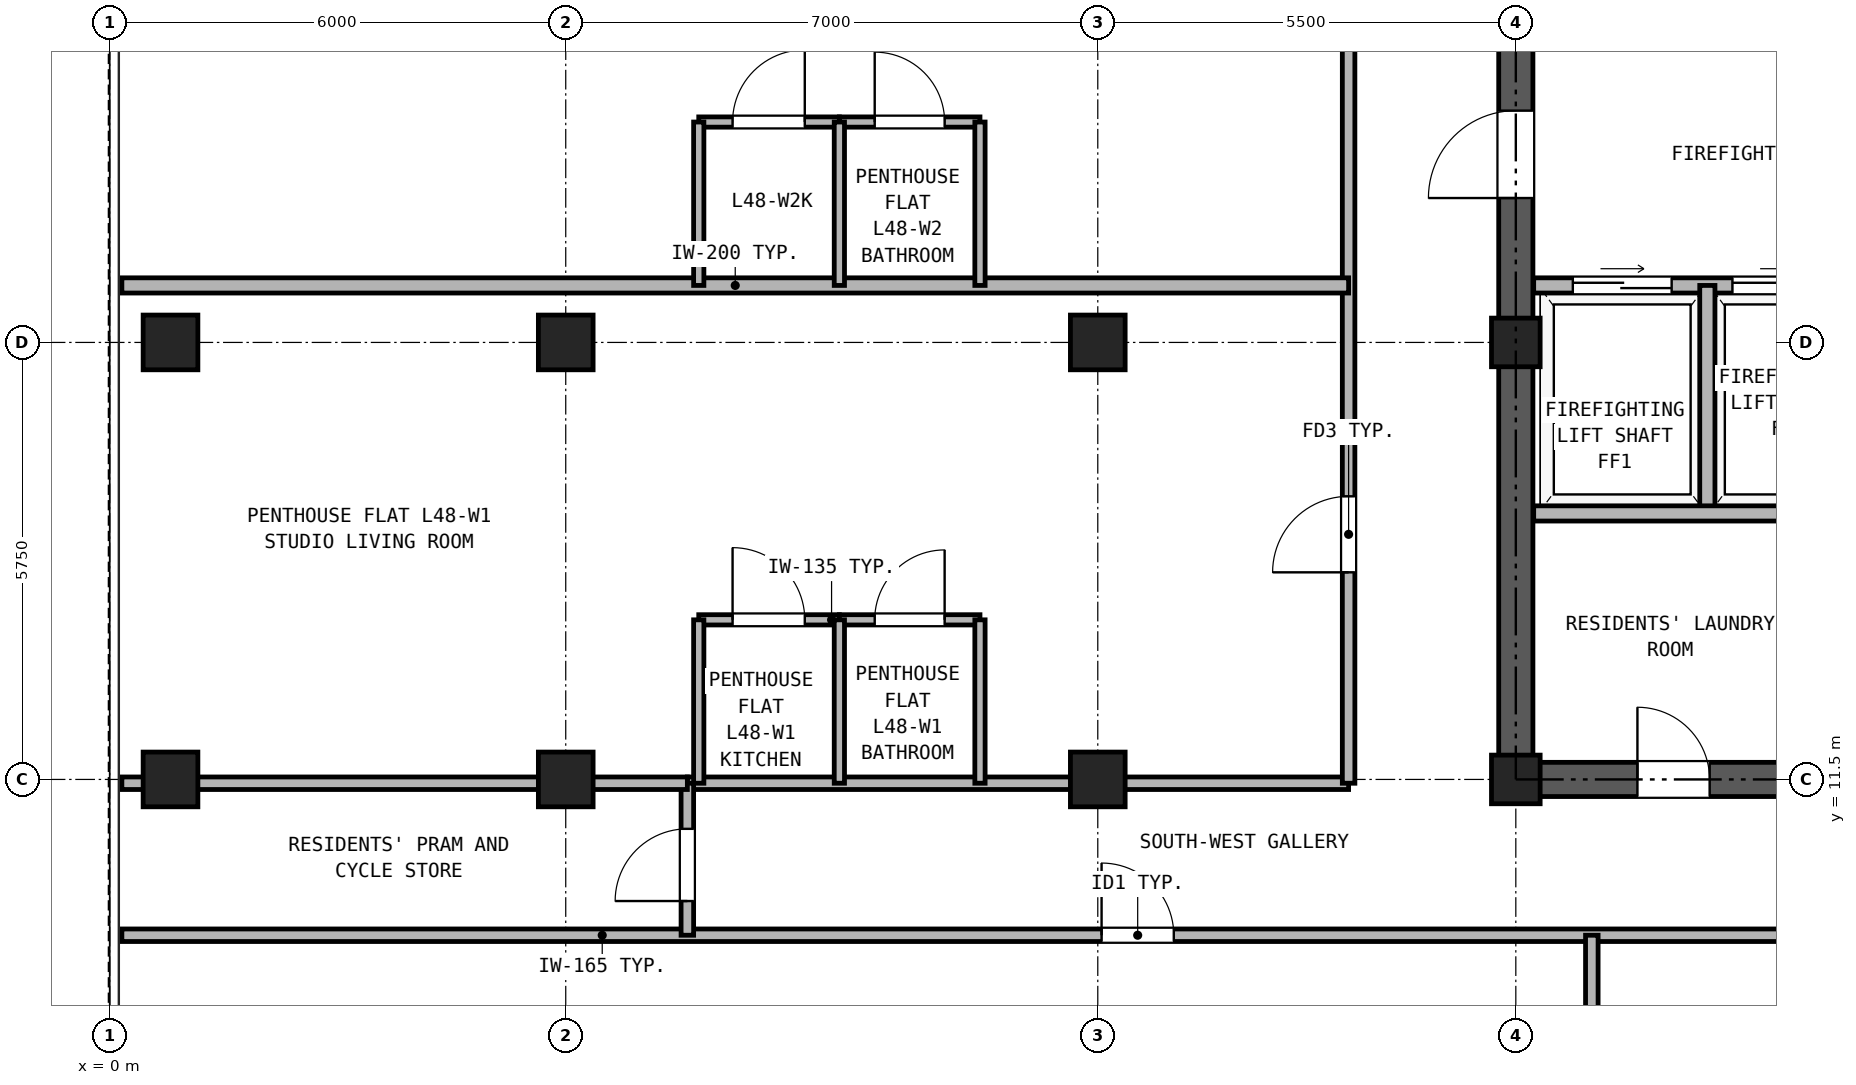
"""IFC4 building model, lengths in metres.
Left out: names, types, materials, properties, quantities, classifications, styles, units other than length and angle.
Written with IfcOpenShell. Run it as: python <this file> out.ifc"""

import sys

from ifc_helpers import new_model, si_unit, direction, frame, frame_2d, origin, origin_2d, place, context, subcontext, project, spatial, rectangle, hollow_rectangle, extrude, source, transform, mapped, element, fill, save


model = new_model("IFC4")
c1 = context("Model", 3, precision=1e-05, world=origin(), true_north=direction((0.0, 1.0)))
c2 = subcontext(c1, "Body", "Model", "MODEL_VIEW")
j1 = project(units=[si_unit("LENGTHUNIT", "METRE"), si_unit("PLANEANGLEUNIT", "RADIAN")], contexts=[c1])
p1 = place(None, origin())
s1 = spatial("IfcSite", under=j1, at=p1, CompositionType="ELEMENT")
p2 = place(p1, origin())
s2 = spatial("IfcBuilding", under=s1, at=p2, CompositionType="ELEMENT")
p3 = place(p2, frame((0.0, 0.0, 172.1)))
s3 = spatial("IfcBuildingStorey", under=s2, at=p3, CompositionType="ELEMENT", Elevation=172.1)
m1 = source(origin(), c2, "Body", "SweptSolid", [
    extrude(hollow_rectangle(XDim=0.72, YDim=0.72, WallThickness=0.04, at=origin_2d()), origin(), (0.0, 0.0, 1.0), 2.95),
])
for number, where, z_axis, x_axis in (
    (1, (0.8, 11.5, 0.0), (0.0, 0.0, 1.0), (1.0, 0.0, 0.0)),
    (2, (0.8, 17.25, 0.0), (0.0, 0.0, 1.0), (1.0, 0.0, 0.0)),
    (3, (6.0, 11.5, 0.0), (0.0, 0.0, 1.0), (1.0, 0.0, 0.0)),
    (4, (6.0, 17.25, 0.0), (0.0, 0.0, 1.0), (1.0, 0.0, 0.0)),
    (5, (13.0, 11.5, 0.0), (0.0, 0.0, 1.0), (1.0, 0.0, 0.0)),
    (6, (13.0, 17.25, 0.0), (0.0, 0.0, 1.0), (1.0, 0.0, 0.0)),
):
    element("IfcColumn", number, at=place(p3, frame(where, z_axis=z_axis, x_axis=x_axis)), inside=s3, PredefinedType="COLUMN", context=c2, shape_type="MappedRepresentation", body=[
        mapped(m1, transform((0.0, 0.0, 0.0), x_axis=(1.0, 0.0, 0.0), y_axis=(0.0, 1.0, 0.0), z_axis=(0.0, 0.0, 1.0), scale=1.0)),
    ])
m2 = source(origin(), c2, "Body", "SweptSolid", [
    extrude(hollow_rectangle(XDim=0.64, YDim=0.64, WallThickness=0.035, at=origin_2d()), origin(), (0.0, 0.0, 1.0), 2.95),
])
for number, where, z_axis, x_axis in (
    (7, (18.5, 11.5, 0.0), (0.0, 0.0, 1.0), (1.0, 0.0, 0.0)),
    (8, (18.5, 17.25, 0.0), (0.0, 0.0, 1.0), (1.0, 0.0, 0.0)),
):
    element("IfcColumn", number, at=place(p3, frame(where, z_axis=z_axis, x_axis=x_axis)), inside=s3, PredefinedType="COLUMN", context=c2, shape_type="MappedRepresentation", body=[
        mapped(m2, transform((0.0, 0.0, 0.0), x_axis=(1.0, 0.0, 0.0), y_axis=(0.0, 1.0, 0.0), z_axis=(0.0, 0.0, 1.0), scale=1.0)),
    ])
p4 = place(p3, frame((18.275, 11.5, 0.0), z_axis=(0.0, 0.0, 1.0), x_axis=(1.0, 0.0, 0.0)))
e9 = element("IfcWall", 9, at=p4, inside=s3, PredefinedType="SHEAR", context=c2, shape_type="SweptSolid", body=[
    extrude(rectangle(XDim=10.45, YDim=0.45, at=frame_2d((5.225, 0.0))), origin(), (0.0, 0.0, 1.0), 2.95),
])
p5 = place(p4, frame((1.825, 0.0, 0.0)))
e10 = element("IfcOpeningElement", 10, at=p5, cuts=e9, PredefinedType="OPENING", context=c2, shape_type="SweptSolid", body=[
    extrude(rectangle(XDim=0.95, YDim=2.15, at=frame_2d((0.475, 1.075))), frame((0.0, 0.235, 0.0), z_axis=(0.0, -1.0, 0.0), x_axis=(1.0, 0.0, 0.0)), (0.0, 0.0, 1.0), 0.47),
])
p6 = place(p4, frame((5.325, 0.0, 0.0)))
e11 = element("IfcOpeningElement", 11, at=p6, cuts=e9, PredefinedType="OPENING", context=c2, shape_type="SweptSolid", body=[
    extrude(rectangle(XDim=0.95, YDim=2.15, at=frame_2d((0.475, 1.075))), frame((0.0, 0.235, 0.0), z_axis=(0.0, -1.0, 0.0), x_axis=(1.0, 0.0, 0.0)), (0.0, 0.0, 1.0), 0.47),
])
p7 = place(p4, frame((8.225, 0.0, 0.0)))
e12 = element("IfcOpeningElement", 12, at=p7, cuts=e9, PredefinedType="OPENING", context=c2, shape_type="SweptSolid", body=[
    extrude(rectangle(XDim=1.1, YDim=2.25, at=frame_2d((0.55, 1.125))), frame((0.0, 0.235, 0.0), z_axis=(0.0, -1.0, 0.0), x_axis=(1.0, 0.0, 0.0)), (0.0, 0.0, 1.0), 0.47),
])
p8 = place(p3, frame((18.5, 11.725, 0.0), z_axis=(0.0, 0.0, 1.0), x_axis=(0.0, 1.0, 0.0)))
e13 = element("IfcWall", 13, at=p8, inside=s3, PredefinedType="SHEAR", context=c2, shape_type="SweptSolid", body=[
    extrude(rectangle(XDim=16.8, YDim=0.45, at=frame_2d((8.4, 0.0))), origin(), (0.0, 0.0, 1.0), 2.95),
])
p9 = place(p8, frame((7.425, 0.0, 0.0)))
e14 = element("IfcOpeningElement", 14, at=p9, cuts=e13, PredefinedType="OPENING", context=c2, shape_type="SweptSolid", body=[
    extrude(rectangle(XDim=1.15, YDim=2.2, at=frame_2d((0.575, 1.1))), frame((0.0, 0.235, 0.0), z_axis=(0.0, -1.0, 0.0), x_axis=(1.0, 0.0, 0.0)), (0.0, 0.0, 1.0), 0.47),
])
p10 = place(p3, frame((18.735, 18.0, 0.0), z_axis=(0.0, 0.0, 1.0), x_axis=(1.0, 0.0, 0.0)))
e15 = element("IfcWall", 15, at=p10, inside=s3, PredefinedType="PARTITIONING", context=c2, shape_type="SweptSolid", body=[
    extrude(rectangle(XDim=9.53, YDim=0.2, at=frame_2d((4.765, 0.0))), origin(), (0.0, 0.0, 1.0), 2.95),
])
p11 = place(p10, frame((0.515, 0.0, 0.0)))
e16 = element("IfcOpeningElement", 16, at=p11, cuts=e15, PredefinedType="OPENING", context=c2, shape_type="SweptSolid", body=[
    extrude(rectangle(XDim=1.3, YDim=2.3, at=frame_2d((0.65, 1.15))), frame((0.0, 0.11, 0.0), z_axis=(0.0, -1.0, 0.0), x_axis=(1.0, 0.0, 0.0)), (0.0, 0.0, 1.0), 0.22),
])
p12 = place(p10, frame((2.615, 0.0, 0.0)))
e17 = element("IfcOpeningElement", 17, at=p12, cuts=e15, PredefinedType="OPENING", context=c2, shape_type="SweptSolid", body=[
    extrude(rectangle(XDim=1.3, YDim=2.3, at=frame_2d((0.65, 1.15))), frame((0.0, 0.11, 0.0), z_axis=(0.0, -1.0, 0.0), x_axis=(1.0, 0.0, 0.0)), (0.0, 0.0, 1.0), 0.22),
])
p13 = place(p10, frame((7.115, 0.0, 0.0)))
e18 = element("IfcOpeningElement", 18, at=p13, cuts=e15, PredefinedType="OPENING", context=c2, shape_type="SweptSolid", body=[
    extrude(rectangle(XDim=1.0, YDim=2.15, at=frame_2d((0.5, 1.075))), frame((0.0, 0.11, 0.0), z_axis=(0.0, -1.0, 0.0), x_axis=(1.0, 0.0, 0.0)), (0.0, 0.0, 1.0), 0.22),
])
p14 = place(p3, frame((21.02, 15.0, 0.0), z_axis=(0.0, 0.0, 1.0), x_axis=(0.0, 1.0, 0.0)))
e19 = element("IfcWall", 19, at=p14, inside=s3, PredefinedType="PARTITIONING", context=c2, shape_type="SweptSolid", body=[
    extrude(rectangle(XDim=3.0, YDim=0.2, at=frame_2d((1.5, 0.0))), origin(), (0.0, 0.0, 1.0), 2.95),
])
p15 = place(p3, frame((18.735, 15.0, 0.0), z_axis=(0.0, 0.0, 1.0), x_axis=(1.0, 0.0, 0.0)))
e20 = element("IfcWall", 20, at=p15, inside=s3, PredefinedType="PARTITIONING", context=c2, shape_type="SweptSolid", body=[
    extrude(rectangle(XDim=9.53, YDim=0.2, at=frame_2d((4.765, 0.0))), origin(), (0.0, 0.0, 1.0), 2.95),
])
p16 = place(p3, frame((0.16, 9.45, 0.0), z_axis=(0.0, 0.0, 1.0), x_axis=(1.0, 0.0, 0.0)))
e21 = element("IfcWall", 21, at=p16, inside=s3, PredefinedType="PARTITIONING", context=c2, shape_type="SweptSolid", body=[
    extrude(rectangle(XDim=41.48, YDim=0.165, at=frame_2d((20.74, 0.0))), origin(), (0.0, 0.0, 1.0), 2.95),
])
p17 = place(p16, frame((12.89, 0.0, 0.0)))
e22 = element("IfcOpeningElement", 22, at=p17, cuts=e21, PredefinedType="OPENING", context=c2, shape_type="SweptSolid", body=[
    extrude(rectangle(XDim=0.95, YDim=2.15, at=frame_2d((0.475, 1.075))), frame((0.0, 0.093, 0.0), z_axis=(0.0, -1.0, 0.0), x_axis=(1.0, 0.0, 0.0)), (0.0, 0.0, 1.0), 0.185),
])
p18 = place(p16, frame((23.34, 0.0, 0.0)))
e23 = element("IfcOpeningElement", 23, at=p18, cuts=e21, PredefinedType="OPENING", context=c2, shape_type="SweptSolid", body=[
    extrude(rectangle(XDim=0.95, YDim=2.15, at=frame_2d((0.475, 1.075))), frame((0.0, 0.093, 0.0), z_axis=(0.0, -1.0, 0.0), x_axis=(1.0, 0.0, 0.0)), (0.0, 0.0, 1.0), 0.185),
])
p19 = place(p16, frame((30.34, 0.0, 0.0)))
e24 = element("IfcOpeningElement", 24, at=p19, cuts=e21, PredefinedType="OPENING", context=c2, shape_type="SweptSolid", body=[
    extrude(rectangle(XDim=0.95, YDim=2.15, at=frame_2d((0.475, 1.075))), frame((0.0, 0.093, 0.0), z_axis=(0.0, -1.0, 0.0), x_axis=(1.0, 0.0, 0.0)), (0.0, 0.0, 1.0), 0.185),
])
p20 = place(p16, frame((35.19, 0.0, 0.0)))
e25 = element("IfcOpeningElement", 25, at=p20, cuts=e21, PredefinedType="OPENING", context=c2, shape_type="SweptSolid", body=[
    extrude(rectangle(XDim=0.95, YDim=2.15, at=frame_2d((0.475, 1.075))), frame((0.0, 0.093, 0.0), z_axis=(0.0, -1.0, 0.0), x_axis=(1.0, 0.0, 0.0)), (0.0, 0.0, 1.0), 0.185),
])
p21 = place(p3, frame((7.6, 11.45, 0.0), z_axis=(0.0, 0.0, 1.0), x_axis=(1.0, 0.0, 0.0)))
e26 = element("IfcWall", 26, at=p21, inside=s3, PredefinedType="PARTITIONING", context=c2, shape_type="SweptSolid", body=[
    extrude(rectangle(XDim=8.7, YDim=0.165, at=frame_2d((4.35, 0.0))), origin(), (0.0, 0.0, 1.0), 2.323),
])
p22 = place(p3, frame((7.6, 9.45, 0.0), z_axis=(0.0, 0.0, 1.0), x_axis=(0.0, 1.0, 0.0)))
e27 = element("IfcWall", 27, at=p22, inside=s3, PredefinedType="PARTITIONING", context=c2, shape_type="SweptSolid", body=[
    extrude(rectangle(XDim=2.0, YDim=0.165, at=frame_2d((1.0, 0.0))), origin(), (0.0, 0.0, 1.0), 2.95),
])
p23 = place(p22, frame((0.45, 0.0, 0.0)))
e28 = element("IfcOpeningElement", 28, at=p23, cuts=e27, PredefinedType="OPENING", context=c2, shape_type="SweptSolid", body=[
    extrude(rectangle(XDim=0.95, YDim=2.15, at=frame_2d((0.475, 1.075))), frame((0.0, 0.093, 0.0), z_axis=(0.0, -1.0, 0.0), x_axis=(1.0, 0.0, 0.0)), (0.0, 0.0, 1.0), 0.185),
])
p24 = place(p3, frame((16.3, 11.45, 0.0), z_axis=(0.0, 0.0, 1.0), x_axis=(0.0, 1.0, 0.0)))
e29 = element("IfcWall", 29, at=p24, inside=s3, PredefinedType="PARTITIONING", context=c2, shape_type="SweptSolid", body=[
    extrude(rectangle(XDim=23.69, YDim=0.165, at=frame_2d((11.845, 0.0))), origin(), (0.0, 0.0, 1.0), 2.95),
])
p25 = place(p24, frame((2.775, 0.0, 0.0)))
e30 = element("IfcOpeningElement", 30, at=p25, cuts=e29, PredefinedType="OPENING", context=c2, shape_type="SweptSolid", body=[
    extrude(rectangle(XDim=1.0, YDim=2.15, at=frame_2d((0.5, 1.075))), frame((0.0, 0.093, 0.0), z_axis=(0.0, -1.0, 0.0), x_axis=(1.0, 0.0, 0.0)), (0.0, 0.0, 1.0), 0.185),
])
p26 = place(p24, frame((10.3, 0.0, 0.0)))
e31 = element("IfcOpeningElement", 31, at=p26, cuts=e29, PredefinedType="OPENING", context=c2, shape_type="SweptSolid", body=[
    extrude(rectangle(XDim=1.0, YDim=2.15, at=frame_2d((0.5, 1.075))), frame((0.0, 0.093, 0.0), z_axis=(0.0, -1.0, 0.0), x_axis=(1.0, 0.0, 0.0)), (0.0, 0.0, 1.0), 0.185),
])
p27 = place(p24, frame((16.575, 0.0, 0.0)))
e32 = element("IfcOpeningElement", 32, at=p27, cuts=e29, PredefinedType="OPENING", context=c2, shape_type="SweptSolid", body=[
    extrude(rectangle(XDim=1.0, YDim=2.15, at=frame_2d((0.5, 1.075))), frame((0.0, 0.093, 0.0), z_axis=(0.0, -1.0, 0.0), x_axis=(1.0, 0.0, 0.0)), (0.0, 0.0, 1.0), 0.185),
])
p28 = place(p3, frame((19.5, 0.16, 0.0), z_axis=(0.0, 0.0, 1.0), x_axis=(0.0, 1.0, 0.0)))
e33 = element("IfcWall", 33, at=p28, inside=s3, PredefinedType="PARTITIONING", context=c2, shape_type="SweptSolid", body=[
    extrude(rectangle(XDim=9.29, YDim=0.165, at=frame_2d((4.645, 0.0))), origin(), (0.0, 0.0, 1.0), 2.95),
])
p29 = place(p3, frame((0.16, 11.45, 0.0), z_axis=(0.0, 0.0, 1.0), x_axis=(1.0, 0.0, 0.0)))
e34 = element("IfcWall", 34, at=p29, inside=s3, PredefinedType="PARTITIONING", context=c2, shape_type="SweptSolid", body=[
    extrude(rectangle(XDim=7.44, YDim=0.165, at=frame_2d((3.72, 0.0))), origin(), (0.0, 0.0, 1.0), 2.323),
])
p30 = place(p3, frame((7.75, 13.6, 0.0), z_axis=(0.0, 0.0, 1.0), x_axis=(1.0, 0.0, 0.0)))
e35 = element("IfcWall", 35, at=p30, inside=s3, PredefinedType="PARTITIONING", context=c2, shape_type="SweptSolid", body=[
    extrude(rectangle(XDim=1.85, YDim=0.135, at=frame_2d((0.925, 0.0))), origin(), (0.0, 0.0, 1.0), 2.95),
])
p31 = place(p30, frame((0.445, 0.0, 0.0)))
e36 = element("IfcOpeningElement", 36, at=p31, cuts=e35, PredefinedType="OPENING", context=c2, shape_type="SweptSolid", body=[
    extrude(rectangle(XDim=0.95, YDim=2.15, at=frame_2d((0.475, 1.075))), frame((0.0, 0.077, 0.0), z_axis=(0.0, -1.0, 0.0), x_axis=(1.0, 0.0, 0.0)), (0.0, 0.0, 1.0), 0.155),
])
p32 = place(p3, frame((9.6, 13.6, 0.0), z_axis=(0.0, 0.0, 1.0), x_axis=(1.0, 0.0, 0.0)))
e37 = element("IfcWall", 37, at=p32, inside=s3, PredefinedType="PARTITIONING", context=c2, shape_type="SweptSolid", body=[
    extrude(rectangle(XDim=1.85, YDim=0.135, at=frame_2d((0.925, 0.0))), origin(), (0.0, 0.0, 1.0), 2.95),
])
p33 = place(p32, frame((0.465, 0.0, 0.0)))
e38 = element("IfcOpeningElement", 38, at=p33, cuts=e37, PredefinedType="OPENING", context=c2, shape_type="SweptSolid", body=[
    extrude(rectangle(XDim=0.92, YDim=2.1, at=frame_2d((0.46, 1.05))), frame((0.0, 0.077, 0.0), z_axis=(0.0, -1.0, 0.0), x_axis=(1.0, 0.0, 0.0)), (0.0, 0.0, 1.0), 0.155),
])
for number, where, z_axis, x_axis in (
    (39, (7.75, 11.45, 0.0), (0.0, 0.0, 1.0), (0.0, 1.0, 0.0)),
    (40, (9.6, 11.45, 0.0), (0.0, 0.0, 1.0), (0.0, 1.0, 0.0)),
    (41, (11.45, 11.45, 0.0), (0.0, 0.0, 1.0), (0.0, 1.0, 0.0)),
):
    element("IfcWall", number, at=place(p3, frame(where, z_axis=z_axis, x_axis=x_axis)), inside=s3, PredefinedType="PARTITIONING", context=c2, shape_type="SweptSolid", body=[
        extrude(rectangle(XDim=2.15, YDim=0.135, at=frame_2d((1.075, 0.0))), origin(), (0.0, 0.0, 1.0), 2.95),
    ])
p34 = place(p3, frame((0.16, 18.0, 0.0), z_axis=(0.0, 0.0, 1.0), x_axis=(1.0, 0.0, 0.0)))
e42 = element("IfcWall", 42, at=p34, inside=s3, PredefinedType="PARTITIONING", context=c2, shape_type="SweptSolid", body=[
    extrude(rectangle(XDim=16.14, YDim=0.2, at=frame_2d((8.07, 0.0))), origin(), (0.0, 0.0, 1.0), 2.95),
])
p35 = place(p3, frame((7.75, 20.15, 0.0), z_axis=(0.0, 0.0, 1.0), x_axis=(1.0, 0.0, 0.0)))
e43 = element("IfcWall", 43, at=p35, inside=s3, PredefinedType="PARTITIONING", context=c2, shape_type="SweptSolid", body=[
    extrude(rectangle(XDim=1.85, YDim=0.135, at=frame_2d((0.925, 0.0))), origin(), (0.0, 0.0, 1.0), 2.583),
])
p36 = place(p35, frame((0.445, 0.0, 0.0)))
e44 = element("IfcOpeningElement", 44, at=p36, cuts=e43, PredefinedType="OPENING", context=c2, shape_type="SweptSolid", body=[
    extrude(rectangle(XDim=0.95, YDim=2.15, at=frame_2d((0.475, 1.075))), frame((0.0, 0.077, 0.0), z_axis=(0.0, -1.0, 0.0), x_axis=(1.0, 0.0, 0.0)), (0.0, 0.0, 1.0), 0.155),
])
p37 = place(p3, frame((9.6, 20.15, 0.0), z_axis=(0.0, 0.0, 1.0), x_axis=(1.0, 0.0, 0.0)))
e45 = element("IfcWall", 45, at=p37, inside=s3, PredefinedType="PARTITIONING", context=c2, shape_type="SweptSolid", body=[
    extrude(rectangle(XDim=1.85, YDim=0.135, at=frame_2d((0.925, 0.0))), origin(), (0.0, 0.0, 1.0), 2.583),
])
p38 = place(p37, frame((0.465, 0.0, 0.0)))
e46 = element("IfcOpeningElement", 46, at=p38, cuts=e45, PredefinedType="OPENING", context=c2, shape_type="SweptSolid", body=[
    extrude(rectangle(XDim=0.92, YDim=2.1, at=frame_2d((0.46, 1.05))), frame((0.0, 0.077, 0.0), z_axis=(0.0, -1.0, 0.0), x_axis=(1.0, 0.0, 0.0)), (0.0, 0.0, 1.0), 0.155),
])
for number, where, z_axis, x_axis in (
    (47, (7.75, 18.0, 0.0), (0.0, 0.0, 1.0), (0.0, 1.0, 0.0)),
    (48, (9.6, 18.0, 0.0), (0.0, 0.0, 1.0), (0.0, 1.0, 0.0)),
    (49, (11.45, 18.0, 0.0), (0.0, 0.0, 1.0), (0.0, 1.0, 0.0)),
):
    element("IfcWall", number, at=place(p3, frame(where, z_axis=z_axis, x_axis=x_axis)), inside=s3, PredefinedType="PARTITIONING", context=c2, shape_type="SweptSolid", body=[
        extrude(rectangle(XDim=2.15, YDim=0.135, at=frame_2d((1.075, 0.0))), origin(), (0.0, 0.0, 1.0), 2.95),
    ])
p39 = place(p11, origin())
e50 = element("IfcDoor", 50, at=p39, inside=s3, OperationType="DOUBLE_DOOR_SLIDING", PredefinedType="DOOR", context=c2, shape_type="SweptSolid", body=[
    extrude(rectangle(XDim=1.3, YDim=2.3, at=frame_2d((0.65, 1.15))), frame((0.0, 0.025, 0.0), z_axis=(0.0, -1.0, 0.0), x_axis=(1.0, 0.0, 0.0)), (0.0, 0.0, 1.0), 0.05),
])
fill(e16, e50)
p40 = place(p12, origin())
e51 = element("IfcDoor", 51, at=p40, inside=s3, OperationType="DOUBLE_DOOR_SLIDING", PredefinedType="DOOR", context=c2, shape_type="SweptSolid", body=[
    extrude(rectangle(XDim=1.3, YDim=2.3, at=frame_2d((0.65, 1.15))), frame((0.0, 0.025, 0.0), z_axis=(0.0, -1.0, 0.0), x_axis=(1.0, 0.0, 0.0)), (0.0, 0.0, 1.0), 0.05),
])
fill(e17, e51)
p41 = place(p9, frame((1.15, 0.0, 0.0), z_axis=(0.0, 0.0, 1.0), x_axis=(-1.0, 0.0, 0.0)))
e52 = element("IfcDoor", 52, at=p41, inside=s3, OperationType="SINGLE_SWING_LEFT", PredefinedType="DOOR", context=c2, shape_type="SweptSolid", body=[
    extrude(rectangle(XDim=1.15, YDim=2.2, at=frame_2d((0.575, 1.1))), frame((0.0, 0.025, 0.0), z_axis=(0.0, -1.0, 0.0), x_axis=(1.0, 0.0, 0.0)), (0.0, 0.0, 1.0), 0.05),
])
fill(e14, e52)
p42 = place(p5, frame((0.95, 0.0, 0.0), z_axis=(0.0, 0.0, 1.0), x_axis=(-1.0, 0.0, 0.0)))
e53 = element("IfcDoor", 53, at=p42, inside=s3, OperationType="SINGLE_SWING_LEFT", PredefinedType="DOOR", context=c2, shape_type="SweptSolid", body=[
    extrude(rectangle(XDim=0.95, YDim=2.15, at=frame_2d((0.475, 1.075))), frame((0.0, 0.025, 0.0), z_axis=(0.0, -1.0, 0.0), x_axis=(1.0, 0.0, 0.0)), (0.0, 0.0, 1.0), 0.05),
])
fill(e10, e53)
p43 = place(p17, frame((0.95, 0.0, 0.0), z_axis=(0.0, 0.0, 1.0), x_axis=(-1.0, 0.0, 0.0)))
e54 = element("IfcDoor", 54, at=p43, inside=s3, OperationType="SINGLE_SWING_LEFT", PredefinedType="DOOR", context=c2, shape_type="SweptSolid", body=[
    extrude(rectangle(XDim=0.95, YDim=2.15, at=frame_2d((0.475, 1.075))), frame((0.0, 0.025, 0.0), z_axis=(0.0, -1.0, 0.0), x_axis=(1.0, 0.0, 0.0)), (0.0, 0.0, 1.0), 0.05),
])
fill(e22, e54)
p44 = place(p23, frame((0.95, 0.0, 0.0), z_axis=(0.0, 0.0, 1.0), x_axis=(-1.0, 0.0, 0.0)))
e55 = element("IfcDoor", 55, at=p44, inside=s3, OperationType="SINGLE_SWING_LEFT", PredefinedType="DOOR", context=c2, shape_type="SweptSolid", body=[
    extrude(rectangle(XDim=0.95, YDim=2.15, at=frame_2d((0.475, 1.075))), frame((0.0, 0.025, 0.0), z_axis=(0.0, -1.0, 0.0), x_axis=(1.0, 0.0, 0.0)), (0.0, 0.0, 1.0), 0.05),
])
fill(e28, e55)
p45 = place(p31, origin())
e56 = element("IfcDoor", 56, at=p45, inside=s3, OperationType="SINGLE_SWING_LEFT", PredefinedType="DOOR", context=c2, shape_type="SweptSolid", body=[
    extrude(rectangle(XDim=0.95, YDim=2.15, at=frame_2d((0.475, 1.075))), frame((0.0, 0.025, 0.0), z_axis=(0.0, -1.0, 0.0), x_axis=(1.0, 0.0, 0.0)), (0.0, 0.0, 1.0), 0.05),
])
fill(e36, e56)
p46 = place(p33, origin())
e57 = element("IfcDoor", 57, at=p46, inside=s3, OperationType="SINGLE_SWING_RIGHT", PredefinedType="DOOR", context=c2, shape_type="SweptSolid", body=[
    extrude(rectangle(XDim=0.92, YDim=2.1, at=frame_2d((0.46, 1.05))), frame((0.0, 0.025, 0.0), z_axis=(0.0, -1.0, 0.0), x_axis=(1.0, 0.0, 0.0)), (0.0, 0.0, 1.0), 0.05),
])
fill(e38, e57)
p47 = place(p25, origin())
e58 = element("IfcDoor", 58, at=p47, inside=s3, OperationType="SINGLE_SWING_LEFT", PredefinedType="DOOR", context=c2, shape_type="SweptSolid", body=[
    extrude(rectangle(XDim=1.0, YDim=2.15, at=frame_2d((0.5, 1.075))), frame((0.0, 0.025, 0.0), z_axis=(0.0, -1.0, 0.0), x_axis=(1.0, 0.0, 0.0)), (0.0, 0.0, 1.0), 0.05),
])
fill(e30, e58)
p48 = place(p36, origin())
e59 = element("IfcDoor", 59, at=p48, inside=s3, OperationType="SINGLE_SWING_RIGHT", PredefinedType="DOOR", context=c2, shape_type="SweptSolid", body=[
    extrude(rectangle(XDim=0.95, YDim=2.15, at=frame_2d((0.475, 1.075))), frame((0.0, 0.025, 0.0), z_axis=(0.0, -1.0, 0.0), x_axis=(1.0, 0.0, 0.0)), (0.0, 0.0, 1.0), 0.05),
])
fill(e44, e59)
p49 = place(p38, origin())
e60 = element("IfcDoor", 60, at=p49, inside=s3, OperationType="SINGLE_SWING_LEFT", PredefinedType="DOOR", context=c2, shape_type="SweptSolid", body=[
    extrude(rectangle(XDim=0.92, YDim=2.1, at=frame_2d((0.46, 1.05))), frame((0.0, 0.025, 0.0), z_axis=(0.0, -1.0, 0.0), x_axis=(1.0, 0.0, 0.0)), (0.0, 0.0, 1.0), 0.05),
])
fill(e46, e60)
save(model, sys.argv[1])
